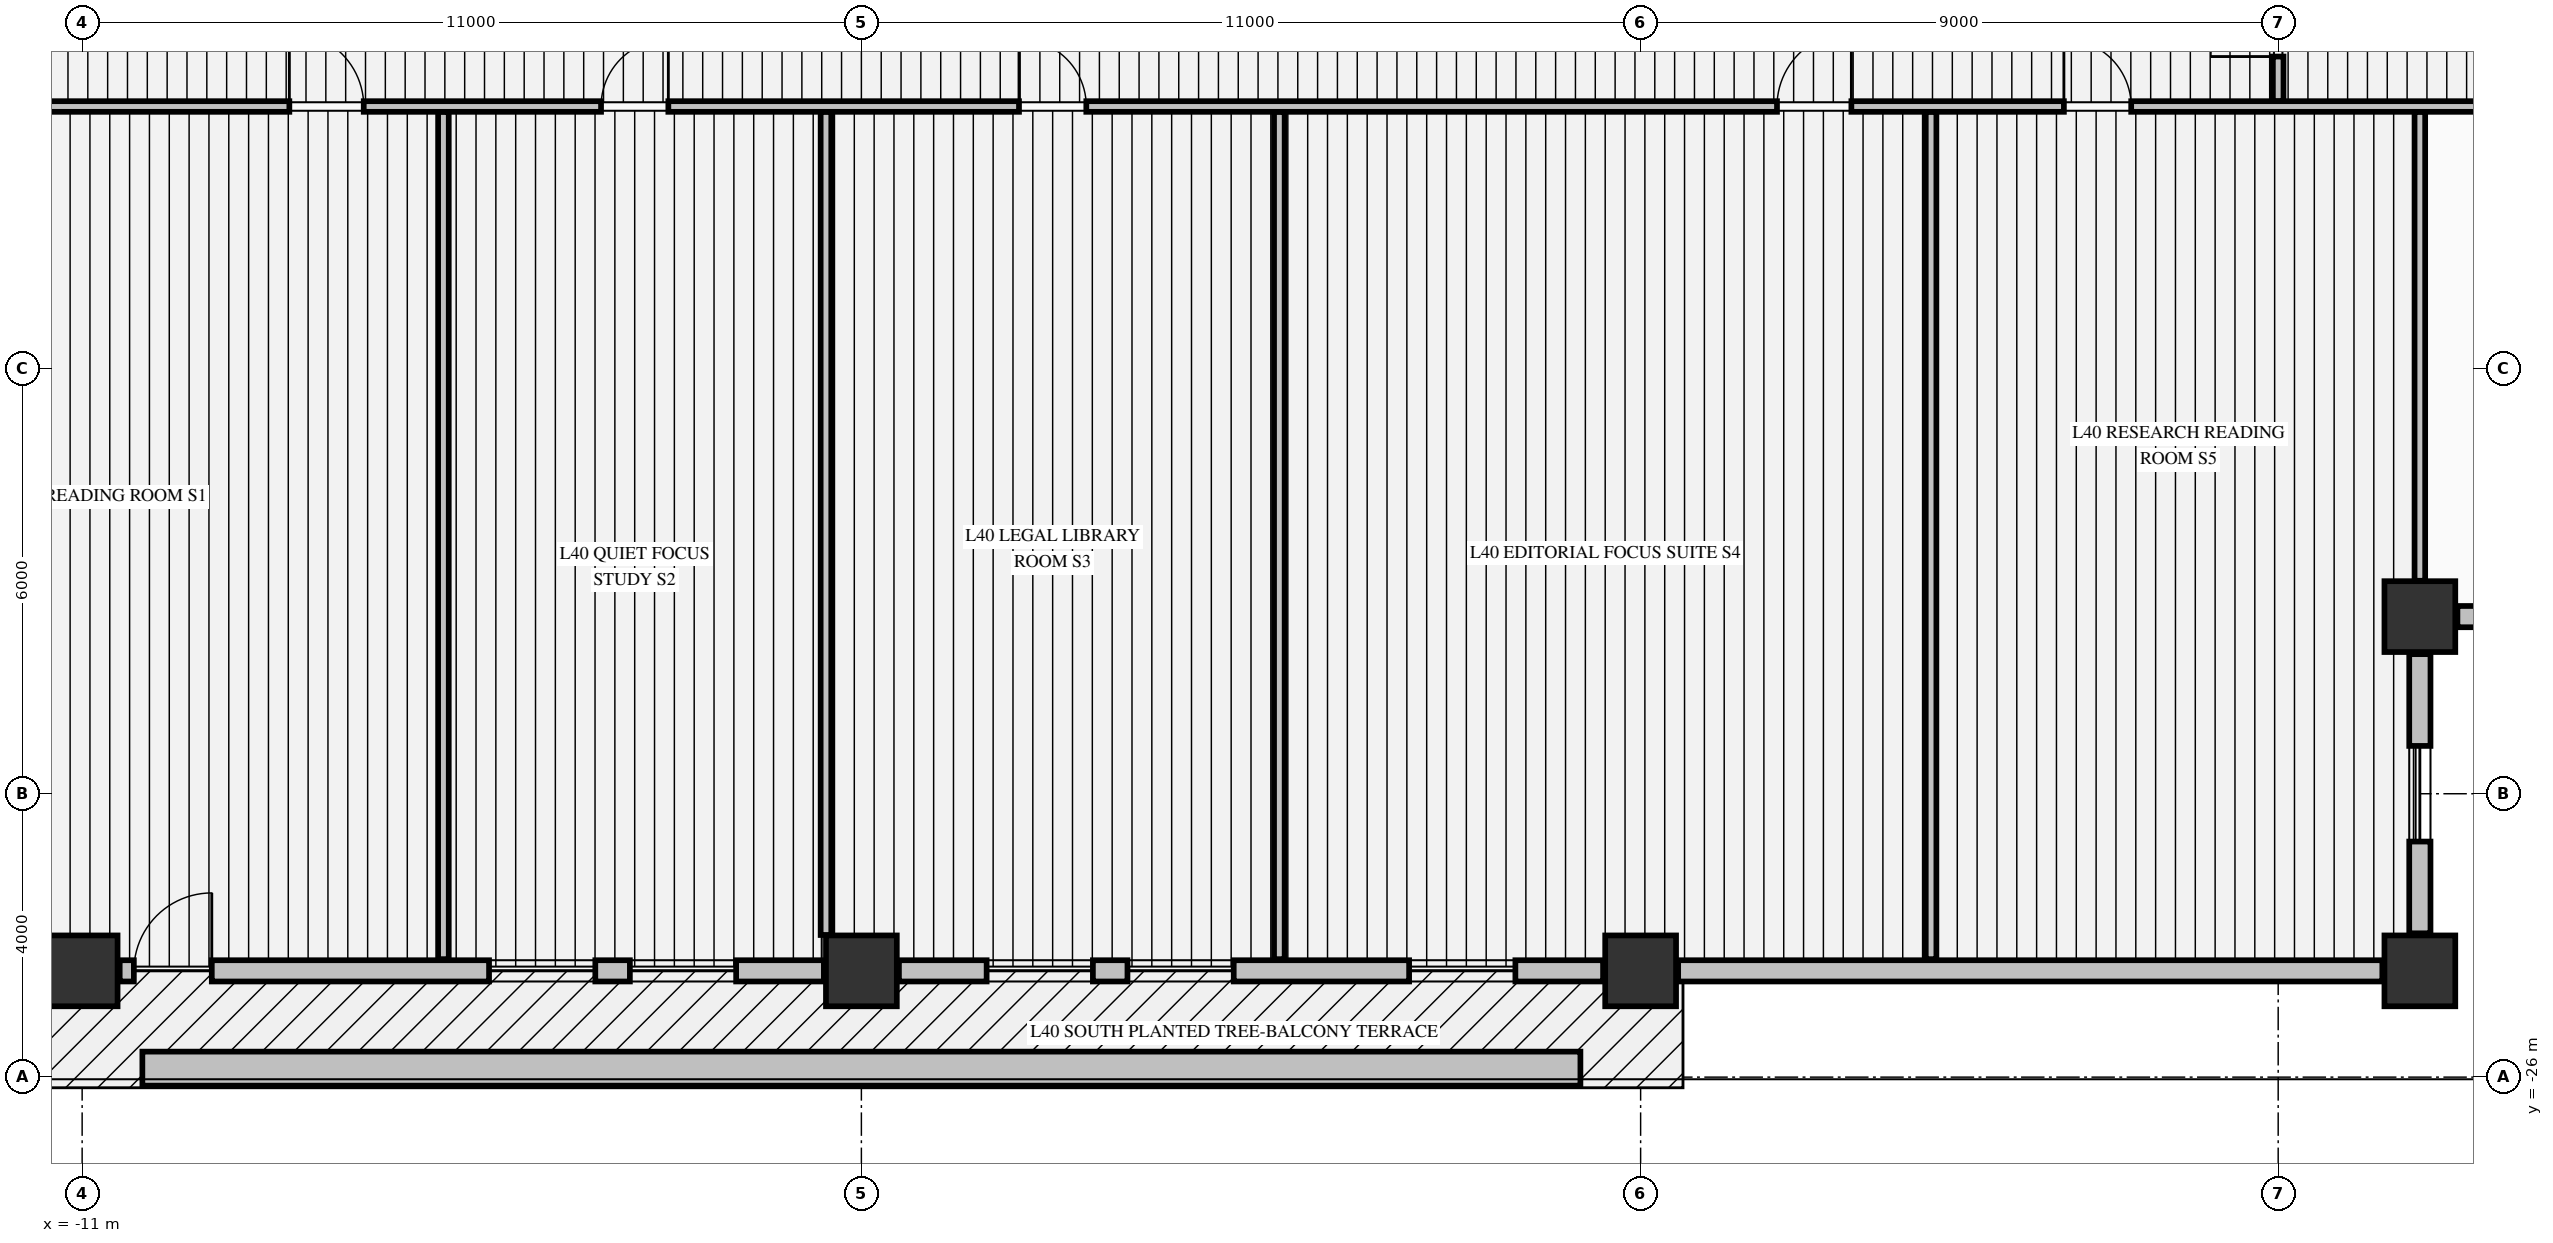
"""IFC4 building model, lengths in metres.
Left out: names, types, materials, properties, quantities, classifications, styles, units other than length and angle.
Written with IfcOpenShell. Run it as: python <this file> out.ifc"""

import sys

from ifc_helpers import new_model, si_unit, direction, frame, frame_2d, origin, origin_2d, place, context, subcontext, project, spatial, rectangle, extrude, element, fill, save


model = new_model("IFC4")
c1 = context("Model", 3, precision=1e-05, world=origin(), true_north=direction((0.0, 1.0)))
c2 = subcontext(c1, "Body", "Model", "MODEL_VIEW")
j1 = project(units=[si_unit("LENGTHUNIT", "METRE"), si_unit("PLANEANGLEUNIT", "RADIAN")], contexts=[c1])
p1 = place(None, origin())
s1 = spatial("IfcSite", under=j1, at=p1, CompositionType="ELEMENT")
p2 = place(p1, origin())
s2 = spatial("IfcBuilding", under=s1, at=p2, CompositionType="ELEMENT")
p3 = place(p2, frame((0.0, 0.0, 158.24)))
s3 = spatial("IfcBuildingStorey", under=s2, at=p3, CompositionType="ELEMENT", Elevation=158.24)
for number, where, z_axis, x_axis in (
    (1, (-11.0, -24.5, -0.425), (0.0, 0.0, 1.0), (1.0, 0.0, 0.0)),
    (2, (0.0, -24.5, -0.425), (0.0, 0.0, 1.0), (1.0, 0.0, 0.0)),
    (3, (11.0, -24.5, -0.425), (0.0, 0.0, 1.0), (1.0, 0.0, 0.0)),
    (4, (22.0, -24.5, -0.425), (0.0, 0.0, 1.0), (1.0, 0.0, 0.0)),
    (5, (22.0, -19.5, -0.425), (0.0, 0.0, 1.0), (1.0, 0.0, 0.0)),
):
    element("IfcColumn", number, at=place(p3, frame(where, z_axis=z_axis, x_axis=x_axis)), inside=s3, PredefinedType="COLUMN", context=c2, shape_type="SweptSolid", body=[
        extrude(rectangle(XDim=1.0, YDim=1.0, at=origin_2d()), origin(), (0.0, 0.0, 1.0), 4.595),
    ])
p4 = place(p3, frame((22.0, -23.97, 0.0), z_axis=(0.0, 0.0, 1.0), x_axis=(0.0, 1.0, 0.0)))
e6 = element("IfcWall", 6, at=p4, inside=s3, PredefinedType="STANDARD", context=c2, shape_type="SweptSolid", body=[
    extrude(rectangle(XDim=3.94, YDim=0.3, at=frame_2d((1.97, 0.0))), origin(), (0.0, 0.0, 1.0), 2.362),
])
p5 = place(p4, frame((1.295, 0.0, 0.68)))
e7 = element("IfcOpeningElement", 7, at=p5, cuts=e6, PredefinedType="OPENING", context=c2, shape_type="SweptSolid", body=[
    extrude(rectangle(XDim=1.35, YDim=1.42, at=frame_2d((0.675, 0.71))), frame((0.0, 0.16, 0.0), z_axis=(0.0, -1.0, 0.0), x_axis=(1.0, 0.0, 0.0)), (0.0, 0.0, 1.0), 0.32),
])
p6 = place(p3, frame((22.53, -19.5, 0.0), z_axis=(0.0, 0.0, 1.0), x_axis=(1.0, 0.0, 0.0)))
e8 = element("IfcWall", 8, at=p6, inside=s3, PredefinedType="STANDARD", context=c2, shape_type="SweptSolid", body=[
    extrude(rectangle(XDim=3.94, YDim=0.3, at=frame_2d((1.97, 0.0))), origin(), (0.0, 0.0, 1.0), 2.362),
])
p7 = place(p6, frame((1.295, 0.0, 0.68)))
e9 = element("IfcOpeningElement", 9, at=p7, cuts=e8, PredefinedType="OPENING", context=c2, shape_type="SweptSolid", body=[
    extrude(rectangle(XDim=1.35, YDim=1.42, at=frame_2d((0.675, 0.71))), frame((0.0, 0.16, 0.0), z_axis=(0.0, -1.0, 0.0), x_axis=(1.0, 0.0, 0.0)), (0.0, 0.0, 1.0), 0.32),
])
p8 = place(p3, frame((-10.47, -24.5, 0.0), z_axis=(0.0, 0.0, 1.0), x_axis=(1.0, 0.0, 0.0)))
e10 = element("IfcWall", 10, at=p8, inside=s3, PredefinedType="STANDARD", context=c2, shape_type="SweptSolid", body=[
    extrude(rectangle(XDim=9.94, YDim=0.3, at=frame_2d((4.97, 0.0))), origin(), (0.0, 0.0, 1.0), 3.562),
])
p9 = place(p8, frame((0.2, 0.0, 0.0)))
e11 = element("IfcOpeningElement", 11, at=p9, cuts=e10, PredefinedType="OPENING", context=c2, shape_type="SweptSolid", body=[
    extrude(rectangle(XDim=1.1, YDim=2.15, at=frame_2d((0.55, 1.075))), frame((0.0, 0.16, 0.0), z_axis=(0.0, -1.0, 0.0), x_axis=(1.0, 0.0, 0.0)), (0.0, 0.0, 1.0), 0.32),
])
p10 = place(p8, frame((5.214, 0.0, 0.72)))
e12 = element("IfcOpeningElement", 12, at=p10, cuts=e10, PredefinedType="OPENING", context=c2, shape_type="SweptSolid", body=[
    extrude(rectangle(XDim=1.5, YDim=1.6, at=frame_2d((0.75, 0.8))), frame((0.0, 0.16, 0.0), z_axis=(0.0, -1.0, 0.0), x_axis=(1.0, 0.0, 0.0)), (0.0, 0.0, 1.0), 0.32),
])
p11 = place(p8, frame((7.202, 0.0, 0.72)))
e13 = element("IfcOpeningElement", 13, at=p11, cuts=e10, PredefinedType="OPENING", context=c2, shape_type="SweptSolid", body=[
    extrude(rectangle(XDim=1.5, YDim=1.6, at=frame_2d((0.75, 0.8))), frame((0.0, 0.16, 0.0), z_axis=(0.0, -1.0, 0.0), x_axis=(1.0, 0.0, 0.0)), (0.0, 0.0, 1.0), 0.32),
])
p12 = place(p3, frame((0.53, -24.5, 0.0), z_axis=(0.0, 0.0, 1.0), x_axis=(1.0, 0.0, 0.0)))
e14 = element("IfcWall", 14, at=p12, inside=s3, PredefinedType="STANDARD", context=c2, shape_type="SweptSolid", body=[
    extrude(rectangle(XDim=9.94, YDim=0.3, at=frame_2d((4.97, 0.0))), origin(), (0.0, 0.0, 1.0), 3.562),
])
p13 = place(p12, frame((1.238, 0.0, 0.72)))
e15 = element("IfcOpeningElement", 15, at=p13, cuts=e14, PredefinedType="OPENING", context=c2, shape_type="SweptSolid", body=[
    extrude(rectangle(XDim=1.5, YDim=1.6, at=frame_2d((0.75, 0.8))), frame((0.0, 0.16, 0.0), z_axis=(0.0, -1.0, 0.0), x_axis=(1.0, 0.0, 0.0)), (0.0, 0.0, 1.0), 0.32),
])
p14 = place(p12, frame((3.226, 0.0, 0.72)))
e16 = element("IfcOpeningElement", 16, at=p14, cuts=e14, PredefinedType="OPENING", context=c2, shape_type="SweptSolid", body=[
    extrude(rectangle(XDim=1.5, YDim=1.6, at=frame_2d((0.75, 0.8))), frame((0.0, 0.16, 0.0), z_axis=(0.0, -1.0, 0.0), x_axis=(1.0, 0.0, 0.0)), (0.0, 0.0, 1.0), 0.32),
])
p15 = place(p12, frame((7.202, 0.0, 0.72)))
e17 = element("IfcOpeningElement", 17, at=p15, cuts=e14, PredefinedType="OPENING", context=c2, shape_type="SweptSolid", body=[
    extrude(rectangle(XDim=1.5, YDim=1.6, at=frame_2d((0.75, 0.8))), frame((0.0, 0.16, 0.0), z_axis=(0.0, -1.0, 0.0), x_axis=(1.0, 0.0, 0.0)), (0.0, 0.0, 1.0), 0.32),
])
p16 = place(p3, frame((11.53, -24.5, 0.0), z_axis=(0.0, 0.0, 1.0), x_axis=(1.0, 0.0, 0.0)))
e18 = element("IfcWall", 18, at=p16, inside=s3, PredefinedType="STANDARD", context=c2, shape_type="SweptSolid", body=[
    extrude(rectangle(XDim=9.94, YDim=0.3, at=frame_2d((4.97, 0.0))), origin(), (0.0, 0.0, 1.0), 1.962),
])
p17 = place(p3, frame((-20.075, -12.3, 0.0), z_axis=(0.0, 0.0, 1.0), x_axis=(1.0, 0.0, 0.0)))
e19 = element("IfcWall", 19, at=p17, inside=s3, PredefinedType="PARTITIONING", context=c2, shape_type="SweptSolid", body=[
    extrude(rectangle(XDim=46.91, YDim=0.15, at=frame_2d((23.455, 0.0))), origin(), (0.0, 0.0, 1.0), 4.17),
])
p18 = place(p17, frame((12.0, 0.0, 0.0)))
e20 = element("IfcOpeningElement", 20, at=p18, cuts=e19, PredefinedType="OPENING", context=c2, shape_type="SweptSolid", body=[
    extrude(rectangle(XDim=1.05, YDim=2.15, at=frame_2d((0.525, 1.075))), frame((0.0, 0.085, 0.0), z_axis=(0.0, -1.0, 0.0), x_axis=(1.0, 0.0, 0.0)), (0.0, 0.0, 1.0), 0.17),
])
p19 = place(p17, frame((16.4, 0.0, 0.0)))
e21 = element("IfcOpeningElement", 21, at=p19, cuts=e19, PredefinedType="OPENING", context=c2, shape_type="SweptSolid", body=[
    extrude(rectangle(XDim=0.95, YDim=2.15, at=frame_2d((0.475, 1.075))), frame((0.0, 0.085, 0.0), z_axis=(0.0, -1.0, 0.0), x_axis=(1.0, 0.0, 0.0)), (0.0, 0.0, 1.0), 0.17),
])
p20 = place(p17, frame((22.3, 0.0, 0.0)))
e22 = element("IfcOpeningElement", 22, at=p20, cuts=e19, PredefinedType="OPENING", context=c2, shape_type="SweptSolid", body=[
    extrude(rectangle(XDim=0.95, YDim=2.15, at=frame_2d((0.475, 1.075))), frame((0.0, 0.085, 0.0), z_axis=(0.0, -1.0, 0.0), x_axis=(1.0, 0.0, 0.0)), (0.0, 0.0, 1.0), 0.17),
])
p21 = place(p17, frame((33.0, 0.0, 0.0)))
e23 = element("IfcOpeningElement", 23, at=p21, cuts=e19, PredefinedType="OPENING", context=c2, shape_type="SweptSolid", body=[
    extrude(rectangle(XDim=1.05, YDim=2.15, at=frame_2d((0.525, 1.075))), frame((0.0, 0.085, 0.0), z_axis=(0.0, -1.0, 0.0), x_axis=(1.0, 0.0, 0.0)), (0.0, 0.0, 1.0), 0.17),
])
p22 = place(p17, frame((37.05, 0.0, 0.0)))
e24 = element("IfcOpeningElement", 24, at=p22, cuts=e19, PredefinedType="OPENING", context=c2, shape_type="SweptSolid", body=[
    extrude(rectangle(XDim=0.95, YDim=2.15, at=frame_2d((0.475, 1.075))), frame((0.0, 0.085, 0.0), z_axis=(0.0, -1.0, 0.0), x_axis=(1.0, 0.0, 0.0)), (0.0, 0.0, 1.0), 0.17),
])
p23 = place(p3, frame((-5.9, -24.335, 0.0), z_axis=(0.0, 0.0, 1.0), x_axis=(0.0, 1.0, 0.0)))
e25 = element("IfcWall", 25, at=p23, inside=s3, PredefinedType="PARTITIONING", context=c2, shape_type="SweptSolid", body=[
    extrude(rectangle(XDim=11.957, YDim=0.15, at=frame_2d((5.979, 0.0))), origin(), (0.0, 0.0, 1.0), 4.17),
])
p24 = place(p3, frame((-0.5, -23.994, 0.0), z_axis=(0.0, 0.0, 1.0), x_axis=(0.0, 1.0, 0.0)))
e26 = element("IfcWall", 26, at=p24, inside=s3, PredefinedType="PARTITIONING", context=c2, shape_type="SweptSolid", body=[
    extrude(rectangle(XDim=11.616, YDim=0.15, at=frame_2d((5.808, 0.0))), origin(), (0.0, 0.0, 1.0), 4.17),
])
for number, where, z_axis, x_axis in (
    (27, (5.9, -24.335, 0.0), (0.0, 0.0, 1.0), (0.0, 1.0, 0.0)),
    (28, (15.1, -24.335, 0.0), (0.0, 0.0, 1.0), (0.0, 1.0, 0.0)),
):
    element("IfcWall", number, at=place(p3, frame(where, z_axis=z_axis, x_axis=x_axis)), inside=s3, PredefinedType="PARTITIONING", context=c2, shape_type="SweptSolid", body=[
        extrude(rectangle(XDim=11.957, YDim=0.15, at=frame_2d((5.979, 0.0))), origin(), (0.0, 0.0, 1.0), 4.17),
    ])
p25 = place(p3, frame((20.0, -12.222, 0.0), z_axis=(0.0, 0.0, 1.0), x_axis=(0.0, 1.0, 0.0)))
e29 = element("IfcWall", 29, at=p25, inside=s3, PredefinedType="PARTITIONING", context=c2, shape_type="SweptSolid", body=[
    extrude(rectangle(XDim=1.841, YDim=0.15, at=frame_2d((0.92, 0.0))), origin(), (0.0, 0.0, 1.0), 3.36),
])
p26 = place(p25, frame((0.627, 0.0, 0.0)))
e30 = element("IfcOpeningElement", 30, at=p26, cuts=e29, PredefinedType="OPENING", context=c2, shape_type="SweptSolid", body=[
    extrude(rectangle(XDim=0.95, YDim=2.15, at=frame_2d((0.475, 1.075))), frame((0.0, 0.085, 0.0), z_axis=(0.0, -1.0, 0.0), x_axis=(1.0, 0.0, 0.0)), (0.0, 0.0, 1.0), 0.17),
])
p27 = place(p3, frame((22.0, -18.994, 0.0), z_axis=(0.0, 0.0, 1.0), x_axis=(0.0, 1.0, 0.0)))
e31 = element("IfcWall", 31, at=p27, inside=s3, PredefinedType="PARTITIONING", context=c2, shape_type="SweptSolid", body=[
    extrude(rectangle(XDim=6.616, YDim=0.15, at=frame_2d((3.308, 0.0))), origin(), (0.0, 0.0, 1.0), 4.17),
])
p28 = place(p3, frame((-10.15, -25.88, -0.04), z_axis=(0.0, 0.0, 1.0), x_axis=(1.0, 0.0, 0.0)))
e32 = element("IfcWall", 32, at=p28, inside=s3, PredefinedType="PARAPET", context=c2, shape_type="SweptSolid", body=[
    extrude(rectangle(XDim=20.3, YDim=0.48, at=frame_2d((10.15, 0.0))), origin(), (0.0, 0.0, 1.0), 0.52),
])
p29 = place(p5, origin())
e33 = element("IfcWindow", 33, at=p29, inside=s3, PartitioningType="SINGLE_PANEL", PredefinedType="WINDOW", context=c2, shape_type="SweptSolid", body=[
    extrude(rectangle(XDim=1.35, YDim=1.42, at=frame_2d((0.675, 0.71))), frame((0.0, 0.03, 0.0), z_axis=(0.0, -1.0, 0.0), x_axis=(1.0, 0.0, 0.0)), (0.0, 0.0, 1.0), 0.06),
])
fill(e7, e33)
p30 = place(p9, origin())
e34 = element("IfcDoor", 34, at=p30, inside=s3, OperationType="SINGLE_SWING_RIGHT", PredefinedType="DOOR", context=c2, shape_type="SweptSolid", body=[
    extrude(rectangle(XDim=1.1, YDim=2.15, at=frame_2d((0.55, 1.075))), frame((0.0, 0.025, 0.0), z_axis=(0.0, -1.0, 0.0), x_axis=(1.0, 0.0, 0.0)), (0.0, 0.0, 1.0), 0.05),
])
fill(e11, e34)
p31 = place(p10, origin())
e35 = element("IfcWindow", 35, at=p31, inside=s3, PartitioningType="SINGLE_PANEL", PredefinedType="WINDOW", context=c2, shape_type="SweptSolid", body=[
    extrude(rectangle(XDim=1.5, YDim=1.6, at=frame_2d((0.75, 0.8))), frame((0.0, 0.03, 0.0), z_axis=(0.0, -1.0, 0.0), x_axis=(1.0, 0.0, 0.0)), (0.0, 0.0, 1.0), 0.06),
])
fill(e12, e35)
p32 = place(p11, origin())
e36 = element("IfcWindow", 36, at=p32, inside=s3, PartitioningType="SINGLE_PANEL", PredefinedType="WINDOW", context=c2, shape_type="SweptSolid", body=[
    extrude(rectangle(XDim=1.5, YDim=1.6, at=frame_2d((0.75, 0.8))), frame((0.0, 0.03, 0.0), z_axis=(0.0, -1.0, 0.0), x_axis=(1.0, 0.0, 0.0)), (0.0, 0.0, 1.0), 0.06),
])
fill(e13, e36)
p33 = place(p13, origin())
e37 = element("IfcWindow", 37, at=p33, inside=s3, PartitioningType="SINGLE_PANEL", PredefinedType="WINDOW", context=c2, shape_type="SweptSolid", body=[
    extrude(rectangle(XDim=1.5, YDim=1.6, at=frame_2d((0.75, 0.8))), frame((0.0, 0.03, 0.0), z_axis=(0.0, -1.0, 0.0), x_axis=(1.0, 0.0, 0.0)), (0.0, 0.0, 1.0), 0.06),
])
fill(e15, e37)
p34 = place(p14, origin())
e38 = element("IfcWindow", 38, at=p34, inside=s3, PartitioningType="SINGLE_PANEL", PredefinedType="WINDOW", context=c2, shape_type="SweptSolid", body=[
    extrude(rectangle(XDim=1.5, YDim=1.6, at=frame_2d((0.75, 0.8))), frame((0.0, 0.03, 0.0), z_axis=(0.0, -1.0, 0.0), x_axis=(1.0, 0.0, 0.0)), (0.0, 0.0, 1.0), 0.06),
])
fill(e16, e38)
p35 = place(p15, origin())
e39 = element("IfcWindow", 39, at=p35, inside=s3, PartitioningType="SINGLE_PANEL", PredefinedType="WINDOW", context=c2, shape_type="SweptSolid", body=[
    extrude(rectangle(XDim=1.5, YDim=1.6, at=frame_2d((0.75, 0.8))), frame((0.0, 0.03, 0.0), z_axis=(0.0, -1.0, 0.0), x_axis=(1.0, 0.0, 0.0)), (0.0, 0.0, 1.0), 0.06),
])
fill(e17, e39)
p36 = place(p18, origin())
e40 = element("IfcDoor", 40, at=p36, inside=s3, OperationType="SINGLE_SWING_LEFT", PredefinedType="DOOR", context=c2, shape_type="SweptSolid", body=[
    extrude(rectangle(XDim=1.05, YDim=2.15, at=frame_2d((0.525, 1.075))), frame((0.0, 0.025, 0.0), z_axis=(0.0, -1.0, 0.0), x_axis=(1.0, 0.0, 0.0)), (0.0, 0.0, 1.0), 0.05),
])
fill(e20, e40)
p37 = place(p19, origin())
e41 = element("IfcDoor", 41, at=p37, inside=s3, OperationType="SINGLE_SWING_RIGHT", PredefinedType="DOOR", context=c2, shape_type="SweptSolid", body=[
    extrude(rectangle(XDim=0.95, YDim=2.15, at=frame_2d((0.475, 1.075))), frame((0.0, 0.025, 0.0), z_axis=(0.0, -1.0, 0.0), x_axis=(1.0, 0.0, 0.0)), (0.0, 0.0, 1.0), 0.05),
])
fill(e21, e41)
p38 = place(p20, origin())
e42 = element("IfcDoor", 42, at=p38, inside=s3, OperationType="SINGLE_SWING_LEFT", PredefinedType="DOOR", context=c2, shape_type="SweptSolid", body=[
    extrude(rectangle(XDim=0.95, YDim=2.15, at=frame_2d((0.475, 1.075))), frame((0.0, 0.025, 0.0), z_axis=(0.0, -1.0, 0.0), x_axis=(1.0, 0.0, 0.0)), (0.0, 0.0, 1.0), 0.05),
])
fill(e22, e42)
p39 = place(p21, origin())
e43 = element("IfcDoor", 43, at=p39, inside=s3, OperationType="SINGLE_SWING_RIGHT", PredefinedType="DOOR", context=c2, shape_type="SweptSolid", body=[
    extrude(rectangle(XDim=1.05, YDim=2.15, at=frame_2d((0.525, 1.075))), frame((0.0, 0.025, 0.0), z_axis=(0.0, -1.0, 0.0), x_axis=(1.0, 0.0, 0.0)), (0.0, 0.0, 1.0), 0.05),
])
fill(e23, e43)
p40 = place(p22, origin())
e44 = element("IfcDoor", 44, at=p40, inside=s3, OperationType="SINGLE_SWING_LEFT", PredefinedType="DOOR", context=c2, shape_type="SweptSolid", body=[
    extrude(rectangle(XDim=0.95, YDim=2.15, at=frame_2d((0.475, 1.075))), frame((0.0, 0.025, 0.0), z_axis=(0.0, -1.0, 0.0), x_axis=(1.0, 0.0, 0.0)), (0.0, 0.0, 1.0), 0.05),
])
fill(e24, e44)
p41 = place(p26, origin())
e45 = element("IfcDoor", 45, at=p41, inside=s3, OperationType="SINGLE_SWING_LEFT", PredefinedType="DOOR", context=c2, shape_type="SweptSolid", body=[
    extrude(rectangle(XDim=0.95, YDim=2.15, at=frame_2d((0.475, 1.075))), frame((0.0, 0.025, 0.0), z_axis=(0.0, -1.0, 0.0), x_axis=(1.0, 0.0, 0.0)), (0.0, 0.0, 1.0), 0.05),
])
fill(e30, e45)
save(model, sys.argv[1])
